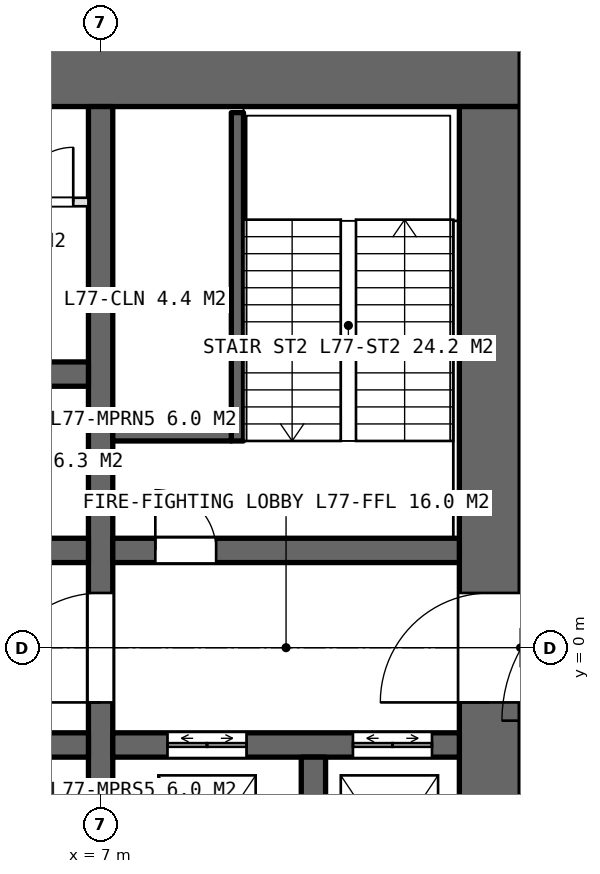
"""IFC4 building model, lengths in metres.
Left out: names, types, materials, properties, quantities, classifications, styles, units other than length and angle.
Written with IfcOpenShell. Run it as: python <this file> out.ifc"""

import sys

from ifc_helpers import new_model, si_unit, direction, frame, frame_2d, origin, place, context, subcontext, project, spatial, rectangle, extrude, element, fill, save


model = new_model("IFC4")
c1 = context("Model", 3, precision=1e-05, world=origin(), true_north=direction((0.0, 1.0)))
c2 = subcontext(c1, "Body", "Model", "MODEL_VIEW")
j1 = project(units=[si_unit("LENGTHUNIT", "METRE"), si_unit("PLANEANGLEUNIT", "RADIAN")], contexts=[c1])
p1 = place(None, origin())
s1 = spatial("IfcSite", under=j1, at=p1, CompositionType="ELEMENT")
p2 = place(p1, origin())
s2 = spatial("IfcBuilding", under=s1, at=p2, CompositionType="ELEMENT")
p3 = place(p2, frame((0.0, 0.0, 344.2)))
s3 = spatial("IfcBuildingStorey", under=s2, at=p3, CompositionType="ELEMENT", Elevation=344.2)
p4 = place(p3, frame((13.9, 9.4, 0.0), z_axis=(0.0, 0.0, 1.0), x_axis=(-1.0, 0.0, 0.0)))
e1 = element("IfcWall", 1, at=p4, inside=s3, PredefinedType="SHEAR", context=c2, shape_type="SweptSolid", body=[
    extrude(rectangle(XDim=27.8, YDim=1.0, at=frame_2d((13.9, 0.0))), origin(), (0.0, 0.0, 1.0), 5.0),
])
p5 = place(p4, frame((23.9, 0.0, 0.0)))
e2 = element("IfcOpeningElement", 2, at=p5, cuts=e1, PredefinedType="OPENING", context=c2, shape_type="SweptSolid", body=[
    extrude(rectangle(XDim=1.0, YDim=2.4, at=frame_2d((0.5, 1.2))), frame((0.0, 0.51, 0.0), z_axis=(0.0, -1.0, 0.0), x_axis=(1.0, 0.0, 0.0)), (0.0, 0.0, 1.0), 1.02),
])
p6 = place(p4, frame((13.0, 0.0, 0.0)))
e3 = element("IfcOpeningElement", 3, at=p6, cuts=e1, PredefinedType="OPENING", context=c2, shape_type="SweptSolid", body=[
    extrude(rectangle(XDim=1.8, YDim=2.4, at=frame_2d((0.9, 1.2))), frame((0.0, 0.51, 0.0), z_axis=(0.0, -1.0, 0.0), x_axis=(1.0, 0.0, 0.0)), (0.0, 0.0, 1.0), 1.02),
])
p7 = place(p3, frame((13.4, -8.9, 0.0), z_axis=(0.0, 0.0, 1.0), x_axis=(0.0, 1.0, 0.0)))
e4 = element("IfcWall", 4, at=p7, inside=s3, PredefinedType="SHEAR", context=c2, shape_type="SweptSolid", body=[
    extrude(rectangle(XDim=17.8, YDim=1.0, at=frame_2d((8.9, 0.0))), origin(), (0.0, 0.0, 1.0), 5.0),
])
p8 = place(p7, frame((8.0, 0.0, 0.0)))
e5 = element("IfcOpeningElement", 5, at=p8, cuts=e4, PredefinedType="OPENING", context=c2, shape_type="SweptSolid", body=[
    extrude(rectangle(XDim=1.8, YDim=2.4, at=frame_2d((0.9, 1.2))), frame((0.0, 0.51, 0.0), z_axis=(0.0, -1.0, 0.0), x_axis=(1.0, 0.0, 0.0)), (0.0, 0.0, 1.0), 1.02),
])
p9 = place(p3, frame((7.0, -8.9, 0.0), z_axis=(0.0, 0.0, 1.0), x_axis=(0.0, 1.0, 0.0)))
e6 = element("IfcWall", 6, at=p9, inside=s3, PredefinedType="SHEAR", context=c2, shape_type="SweptSolid", body=[
    extrude(rectangle(XDim=17.8, YDim=0.4, at=frame_2d((8.9, 0.0))), origin(), (0.0, 0.0, 1.0), 5.0),
])
p10 = place(p9, frame((8.0, 0.0, 0.0)))
e7 = element("IfcOpeningElement", 7, at=p10, cuts=e6, PredefinedType="OPENING", context=c2, shape_type="SweptSolid", body=[
    extrude(rectangle(XDim=1.8, YDim=2.4, at=frame_2d((0.9, 1.2))), frame((0.0, 0.21, 0.0), z_axis=(0.0, -1.0, 0.0), x_axis=(1.0, 0.0, 0.0)), (0.0, 0.0, 1.0), 0.42),
])
p11 = place(p3, frame((-6.8, 1.6, 0.0), z_axis=(0.0, 0.0, 1.0), x_axis=(1.0, 0.0, 0.0)))
e8 = element("IfcWall", 8, at=p11, inside=s3, PredefinedType="SHEAR", context=c2, shape_type="SweptSolid", body=[
    extrude(rectangle(XDim=13.6, YDim=0.4, at=frame_2d((6.8, 0.0))), origin(), (0.0, 0.0, 1.0), 5.0),
])
p12 = place(p11, frame((0.765, 0.0, 0.0)))
e9 = element("IfcOpeningElement", 9, at=p12, cuts=e8, PredefinedType="OPENING", context=c2, shape_type="SweptSolid", body=[
    extrude(rectangle(XDim=1.0, YDim=2.4, at=frame_2d((0.5, 1.2))), frame((0.0, 0.21, 0.0), z_axis=(0.0, -1.0, 0.0), x_axis=(1.0, 0.0, 0.0)), (0.0, 0.0, 1.0), 0.42),
])
p13 = place(p11, frame((3.5, 0.0, 0.0)))
e10 = element("IfcOpeningElement", 10, at=p13, cuts=e8, PredefinedType="OPENING", context=c2, shape_type="SweptSolid", body=[
    extrude(rectangle(XDim=1.0, YDim=2.4, at=frame_2d((0.5, 1.2))), frame((0.0, 0.21, 0.0), z_axis=(0.0, -1.0, 0.0), x_axis=(1.0, 0.0, 0.0)), (0.0, 0.0, 1.0), 0.42),
])
p14 = place(p11, frame((6.3, 0.0, 0.0)))
e11 = element("IfcOpeningElement", 11, at=p14, cuts=e8, PredefinedType="OPENING", context=c2, shape_type="SweptSolid", body=[
    extrude(rectangle(XDim=1.0, YDim=2.4, at=frame_2d((0.5, 1.2))), frame((0.0, 0.21, 0.0), z_axis=(0.0, -1.0, 0.0), x_axis=(1.0, 0.0, 0.0)), (0.0, 0.0, 1.0), 0.42),
])
p15 = place(p11, frame((9.035, 0.0, 0.0)))
e12 = element("IfcOpeningElement", 12, at=p15, cuts=e8, PredefinedType="OPENING", context=c2, shape_type="SweptSolid", body=[
    extrude(rectangle(XDim=1.0, YDim=2.4, at=frame_2d((0.5, 1.2))), frame((0.0, 0.21, 0.0), z_axis=(0.0, -1.0, 0.0), x_axis=(1.0, 0.0, 0.0)), (0.0, 0.0, 1.0), 0.42),
])
p16 = place(p11, frame((11.9, 0.0, 0.0)))
e13 = element("IfcOpeningElement", 13, at=p16, cuts=e8, PredefinedType="OPENING", context=c2, shape_type="SweptSolid", body=[
    extrude(rectangle(XDim=1.0, YDim=2.4, at=frame_2d((0.5, 1.2))), frame((0.0, 0.21, 0.0), z_axis=(0.0, -1.0, 0.0), x_axis=(1.0, 0.0, 0.0)), (0.0, 0.0, 1.0), 0.42),
])
p17 = place(p3, frame((-6.8, -1.6, 0.0), z_axis=(0.0, 0.0, 1.0), x_axis=(1.0, 0.0, 0.0)))
e14 = element("IfcWall", 14, at=p17, inside=s3, PredefinedType="SHEAR", context=c2, shape_type="SweptSolid", body=[
    extrude(rectangle(XDim=13.6, YDim=0.4, at=frame_2d((6.8, 0.0))), origin(), (0.0, 0.0, 1.0), 5.0),
])
p18 = place(p17, frame((0.765, 0.0, 0.0)))
e15 = element("IfcOpeningElement", 15, at=p18, cuts=e14, PredefinedType="OPENING", context=c2, shape_type="SweptSolid", body=[
    extrude(rectangle(XDim=1.0, YDim=2.4, at=frame_2d((0.5, 1.2))), frame((0.0, 0.21, 0.0), z_axis=(0.0, -1.0, 0.0), x_axis=(1.0, 0.0, 0.0)), (0.0, 0.0, 1.0), 0.42),
])
p19 = place(p17, frame((3.5, 0.0, 0.0)))
e16 = element("IfcOpeningElement", 16, at=p19, cuts=e14, PredefinedType="OPENING", context=c2, shape_type="SweptSolid", body=[
    extrude(rectangle(XDim=1.0, YDim=2.4, at=frame_2d((0.5, 1.2))), frame((0.0, 0.21, 0.0), z_axis=(0.0, -1.0, 0.0), x_axis=(1.0, 0.0, 0.0)), (0.0, 0.0, 1.0), 0.42),
])
p20 = place(p17, frame((6.3, 0.0, 0.0)))
e17 = element("IfcOpeningElement", 17, at=p20, cuts=e14, PredefinedType="OPENING", context=c2, shape_type="SweptSolid", body=[
    extrude(rectangle(XDim=1.0, YDim=2.4, at=frame_2d((0.5, 1.2))), frame((0.0, 0.21, 0.0), z_axis=(0.0, -1.0, 0.0), x_axis=(1.0, 0.0, 0.0)), (0.0, 0.0, 1.0), 0.42),
])
p21 = place(p17, frame((9.035, 0.0, 0.0)))
e18 = element("IfcOpeningElement", 18, at=p21, cuts=e14, PredefinedType="OPENING", context=c2, shape_type="SweptSolid", body=[
    extrude(rectangle(XDim=1.0, YDim=2.4, at=frame_2d((0.5, 1.2))), frame((0.0, 0.21, 0.0), z_axis=(0.0, -1.0, 0.0), x_axis=(1.0, 0.0, 0.0)), (0.0, 0.0, 1.0), 0.42),
])
p22 = place(p17, frame((11.9, 0.0, 0.0)))
e19 = element("IfcOpeningElement", 19, at=p22, cuts=e14, PredefinedType="OPENING", context=c2, shape_type="SweptSolid", body=[
    extrude(rectangle(XDim=1.0, YDim=2.4, at=frame_2d((0.5, 1.2))), frame((0.0, 0.21, 0.0), z_axis=(0.0, -1.0, 0.0), x_axis=(1.0, 0.0, 0.0)), (0.0, 0.0, 1.0), 0.42),
])
p23 = place(p3, frame((-6.8, 4.5, 0.0), z_axis=(0.0, 0.0, 1.0), x_axis=(1.0, 0.0, 0.0)))
e20 = element("IfcWall", 20, at=p23, inside=s3, PredefinedType="SHEAR", context=c2, shape_type="SweptSolid", body=[
    extrude(rectangle(XDim=13.6, YDim=0.4, at=frame_2d((6.8, 0.0))), origin(), (0.0, 0.0, 1.0), 5.0),
])
p24 = place(p3, frame((7.2, 1.6, 0.0), z_axis=(0.0, 0.0, 1.0), x_axis=(1.0, 0.0, 0.0)))
e21 = element("IfcWall", 21, at=p24, inside=s3, PredefinedType="SHEAR", context=c2, shape_type="SweptSolid", body=[
    extrude(rectangle(XDim=5.7, YDim=0.4, at=frame_2d((2.85, 0.0))), origin(), (0.0, 0.0, 1.0), 5.0),
])
p25 = place(p24, frame((0.7, 0.0, 0.0)))
e22 = element("IfcOpeningElement", 22, at=p25, cuts=e21, PredefinedType="OPENING", context=c2, shape_type="SweptSolid", body=[
    extrude(rectangle(XDim=1.0, YDim=2.4, at=frame_2d((0.5, 1.2))), frame((0.0, 0.21, 0.0), z_axis=(0.0, -1.0, 0.0), x_axis=(1.0, 0.0, 0.0)), (0.0, 0.0, 1.0), 0.42),
])
p26 = place(p3, frame((7.2, -1.6, 0.0), z_axis=(0.0, 0.0, 1.0), x_axis=(1.0, 0.0, 0.0)))
e23 = element("IfcWall", 23, at=p26, inside=s3, PredefinedType="SHEAR", context=c2, shape_type="SweptSolid", body=[
    extrude(rectangle(XDim=5.7, YDim=0.4, at=frame_2d((2.85, 0.0))), origin(), (0.0, 0.0, 1.0), 5.0),
])
p27 = place(p26, frame((0.9, 0.0, 0.0)))
e24 = element("IfcOpeningElement", 24, at=p27, cuts=e23, PredefinedType="OPENING", context=c2, shape_type="SweptSolid", body=[
    extrude(rectangle(XDim=1.3, YDim=2.4, at=frame_2d((0.65, 1.2))), frame((0.0, 0.21, 0.0), z_axis=(0.0, -1.0, 0.0), x_axis=(1.0, 0.0, 0.0)), (0.0, 0.0, 1.0), 0.42),
])
p28 = place(p26, frame((3.95, 0.0, 0.0)))
e25 = element("IfcOpeningElement", 25, at=p28, cuts=e23, PredefinedType="OPENING", context=c2, shape_type="SweptSolid", body=[
    extrude(rectangle(XDim=1.3, YDim=2.4, at=frame_2d((0.65, 1.2))), frame((0.0, 0.21, 0.0), z_axis=(0.0, -1.0, 0.0), x_axis=(1.0, 0.0, 0.0)), (0.0, 0.0, 1.0), 0.42),
])
p29 = place(p3, frame((10.5, -4.8, 0.0), z_axis=(0.0, 0.0, 1.0), x_axis=(0.0, 1.0, 0.0)))
e26 = element("IfcWall", 26, at=p29, inside=s3, PredefinedType="SHEAR", context=c2, shape_type="SweptSolid", body=[
    extrude(rectangle(XDim=3.0, YDim=0.4, at=frame_2d((1.5, 0.0))), origin(), (0.0, 0.0, 1.0), 5.0),
])
p30 = place(p3, frame((-6.8, 7.33, 0.0), z_axis=(0.0, 0.0, 1.0), x_axis=(1.0, 0.0, 0.0)))
e27 = element("IfcWall", 27, at=p30, inside=s3, PredefinedType="PARTITIONING", context=c2, shape_type="SweptSolid", body=[
    extrude(rectangle(XDim=13.6, YDim=0.14, at=frame_2d((6.8, 0.0))), origin(), (0.0, 0.0, 1.0), 4.7),
])
p31 = place(p30, frame((3.48, 0.0, 0.0)))
e28 = element("IfcOpeningElement", 28, at=p31, cuts=e27, PredefinedType="OPENING", context=c2, shape_type="SweptSolid", body=[
    extrude(rectangle(XDim=1.0, YDim=2.4, at=frame_2d((0.5, 1.2))), frame((0.0, 0.08, 0.0), z_axis=(0.0, -1.0, 0.0), x_axis=(1.0, 0.0, 0.0)), (0.0, 0.0, 1.0), 0.16),
])
p32 = place(p30, frame((7.98, 0.0, 0.0)))
e29 = element("IfcOpeningElement", 29, at=p32, cuts=e27, PredefinedType="OPENING", context=c2, shape_type="SweptSolid", body=[
    extrude(rectangle(XDim=1.0, YDim=2.4, at=frame_2d((0.5, 1.2))), frame((0.0, 0.08, 0.0), z_axis=(0.0, -1.0, 0.0), x_axis=(1.0, 0.0, 0.0)), (0.0, 0.0, 1.0), 0.16),
])
p33 = place(p30, frame((10.38, 0.0, 0.0)))
e30 = element("IfcOpeningElement", 30, at=p33, cuts=e27, PredefinedType="OPENING", context=c2, shape_type="SweptSolid", body=[
    extrude(rectangle(XDim=1.1, YDim=2.4, at=frame_2d((0.55, 1.2))), frame((0.0, 0.08, 0.0), z_axis=(0.0, -1.0, 0.0), x_axis=(1.0, 0.0, 0.0)), (0.0, 0.0, 1.0), 0.16),
])
p34 = place(p30, frame((12.45, 0.0, 0.0)))
e31 = element("IfcOpeningElement", 31, at=p34, cuts=e27, PredefinedType="OPENING", context=c2, shape_type="SweptSolid", body=[
    extrude(rectangle(XDim=0.9, YDim=2.4, at=frame_2d((0.45, 1.2))), frame((0.0, 0.08, 0.0), z_axis=(0.0, -1.0, 0.0), x_axis=(1.0, 0.0, 0.0)), (0.0, 0.0, 1.0), 0.16),
])
p35 = place(p3, frame((9.25, 3.4, 0.0), z_axis=(0.0, 0.0, 1.0), x_axis=(0.0, 1.0, 0.0)))
e32 = element("IfcWall", 32, at=p35, inside=s3, PredefinedType="SOLIDWALL", context=c2, shape_type="SweptSolid", body=[
    extrude(rectangle(XDim=5.4, YDim=0.2, at=frame_2d((2.7, 0.0))), origin(), (0.0, 0.0, 1.0), 5.0),
])
p36 = place(p3, frame((9.15, 3.5, 0.0), z_axis=(0.0, 0.0, 1.0), x_axis=(-1.0, 0.0, 0.0)))
e33 = element("IfcWall", 33, at=p36, inside=s3, PredefinedType="SOLIDWALL", context=c2, shape_type="SweptSolid", body=[
    extrude(rectangle(XDim=1.95, YDim=0.2, at=frame_2d((0.975, 0.0))), origin(), (0.0, 0.0, 1.0), 5.0),
])
p37 = place(p8, origin())
e34 = element("IfcDoor", 34, at=p37, inside=s3, OperationType="DOUBLE_DOOR_SINGLE_SWING", PredefinedType="DOOR", context=c2, shape_type="SweptSolid", body=[
    extrude(rectangle(XDim=1.8, YDim=2.4, at=frame_2d((0.9, 1.2))), frame((0.0, 0.025, 0.0), z_axis=(0.0, -1.0, 0.0), x_axis=(1.0, 0.0, 0.0)), (0.0, 0.0, 1.0), 0.05),
])
fill(e5, e34)
p38 = place(p10, origin())
e35 = element("IfcDoor", 35, at=p38, inside=s3, OperationType="DOUBLE_DOOR_SINGLE_SWING", PredefinedType="DOOR", context=c2, shape_type="SweptSolid", body=[
    extrude(rectangle(XDim=1.8, YDim=2.4, at=frame_2d((0.9, 1.2))), frame((0.0, 0.025, 0.0), z_axis=(0.0, -1.0, 0.0), x_axis=(1.0, 0.0, 0.0)), (0.0, 0.0, 1.0), 0.05),
])
fill(e7, e35)
p39 = place(p25, origin())
e36 = element("IfcDoor", 36, at=p39, inside=s3, OperationType="SINGLE_SWING_LEFT", PredefinedType="DOOR", context=c2, shape_type="SweptSolid", body=[
    extrude(rectangle(XDim=1.0, YDim=2.4, at=frame_2d((0.5, 1.2))), frame((0.0, 0.025, 0.0), z_axis=(0.0, -1.0, 0.0), x_axis=(1.0, 0.0, 0.0)), (0.0, 0.0, 1.0), 0.05),
])
fill(e22, e36)
p40 = place(p34, origin())
e37 = element("IfcDoor", 37, at=p40, inside=s3, OperationType="SINGLE_SWING_RIGHT", PredefinedType="DOOR", context=c2, shape_type="SweptSolid", body=[
    extrude(rectangle(XDim=0.9, YDim=2.4, at=frame_2d((0.45, 1.2))), frame((0.0, 0.025, 0.0), z_axis=(0.0, -1.0, 0.0), x_axis=(1.0, 0.0, 0.0)), (0.0, 0.0, 1.0), 0.05),
])
fill(e31, e37)
p41 = place(p27, origin())
e38 = element("IfcDoor", 38, at=p41, inside=s3, OperationType="DOUBLE_DOOR_SLIDING", PredefinedType="DOOR", context=c2, shape_type="SweptSolid", body=[
    extrude(rectangle(XDim=1.3, YDim=2.4, at=frame_2d((0.65, 1.2))), frame((0.0, 0.025, 0.0), z_axis=(0.0, -1.0, 0.0), x_axis=(1.0, 0.0, 0.0)), (0.0, 0.0, 1.0), 0.05),
])
fill(e24, e38)
p42 = place(p28, origin())
e39 = element("IfcDoor", 39, at=p42, inside=s3, OperationType="DOUBLE_DOOR_SLIDING", PredefinedType="DOOR", context=c2, shape_type="SweptSolid", body=[
    extrude(rectangle(XDim=1.3, YDim=2.4, at=frame_2d((0.65, 1.2))), frame((0.0, 0.025, 0.0), z_axis=(0.0, -1.0, 0.0), x_axis=(1.0, 0.0, 0.0)), (0.0, 0.0, 1.0), 0.05),
])
fill(e25, e39)
save(model, sys.argv[1])
